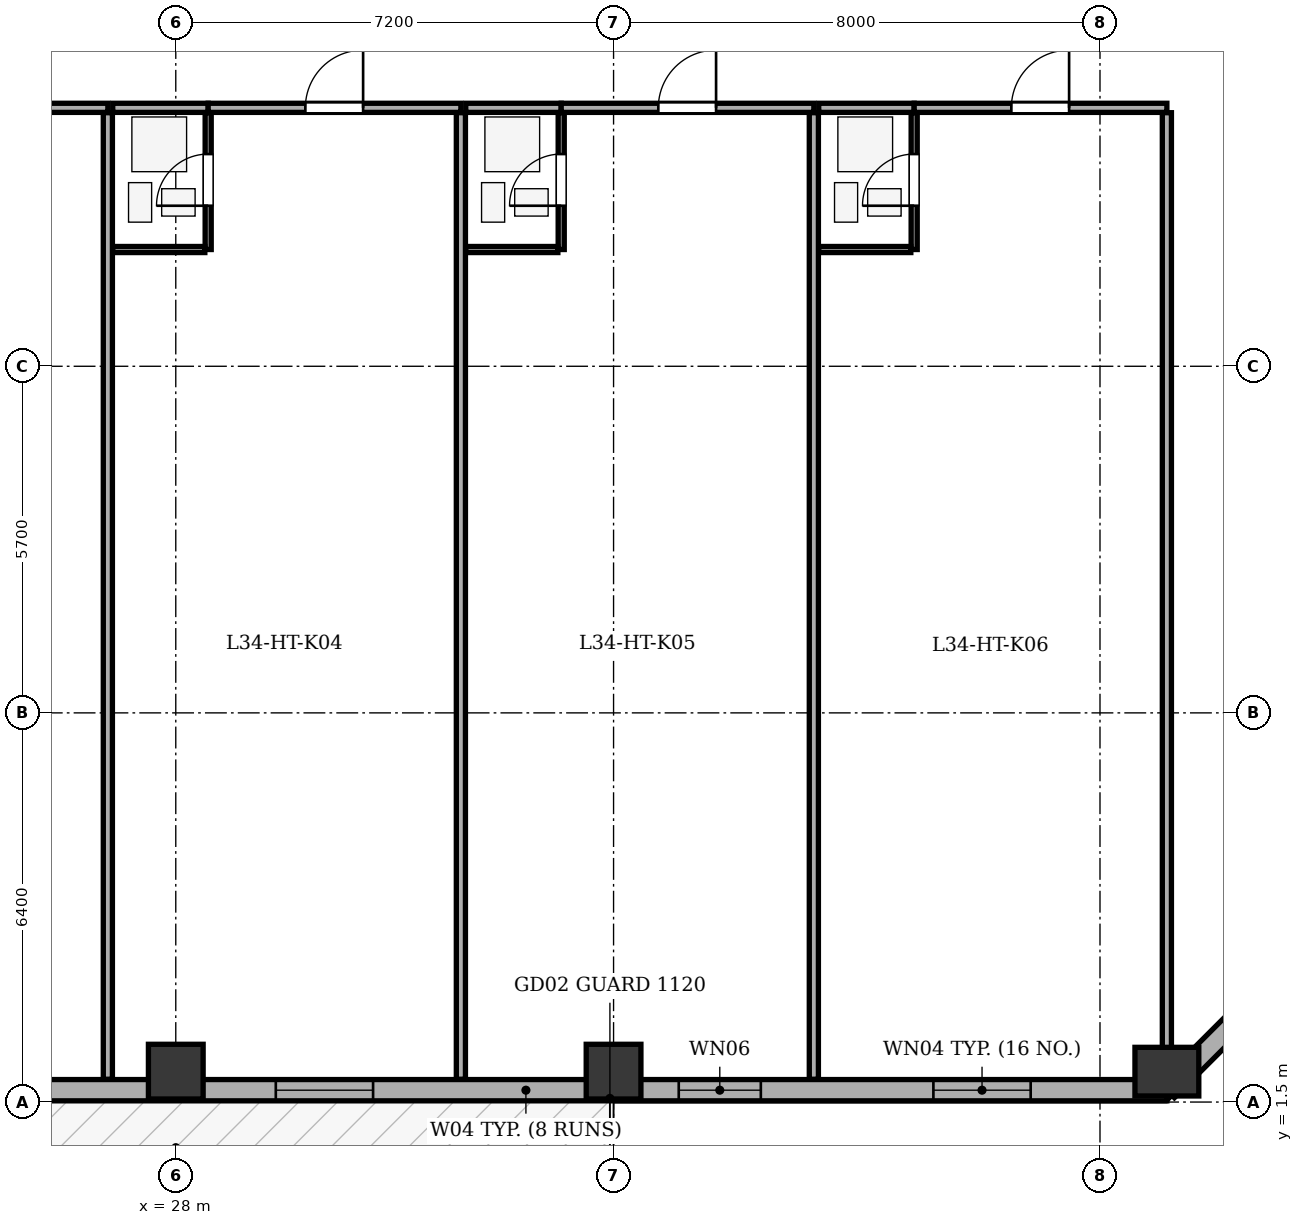
"""IFC4 building model, lengths in metres.
Left out: names, types, materials, properties, quantities, classifications, styles, units other than length and angle.
Written with IfcOpenShell. Run it as: python <this file> out.ifc"""

import sys

from ifc_helpers import new_model, si_unit, direction, frame, frame_2d, origin, origin_2d, place, context, subcontext, project, spatial, rectangle, extrude, element, fill, save


model = new_model("IFC4")
c1 = context("Model", 3, precision=1e-05, world=origin(), true_north=direction((0.0, 1.0)))
c2 = subcontext(c1, "Body", "Model", "MODEL_VIEW")
j1 = project(units=[si_unit("LENGTHUNIT", "METRE"), si_unit("PLANEANGLEUNIT", "RADIAN")], contexts=[c1])
p1 = place(None, origin())
s1 = spatial("IfcSite", under=j1, at=p1, CompositionType="ELEMENT")
p2 = place(p1, origin())
s2 = spatial("IfcBuilding", under=s1, at=p2, CompositionType="ELEMENT")
p3 = place(p2, frame((0.0, 0.0, 137.8)))
s3 = spatial("IfcBuildingStorey", under=s2, at=p3, CompositionType="ELEMENT", Elevation=137.8)
for number, where, z_axis, x_axis in (
    (1, (28.0, 2.0, 0.0), (0.0, 0.0, 1.0), (1.0, 0.0, 0.0)),
    (2, (35.2, 2.0, 0.0), (0.0, 0.0, 1.0), (1.0, 0.0, 0.0)),
):
    element("IfcColumn", number, at=place(p3, frame(where, z_axis=z_axis, x_axis=x_axis)), inside=s3, PredefinedType="COLUMN", context=c2, shape_type="SweptSolid", body=[
        extrude(rectangle(XDim=0.9, YDim=0.9, at=origin_2d()), origin(), (0.0, 0.0, 1.0), 3.5),
    ])
p4 = place(p3, frame((44.3, 2.0, 0.0), z_axis=(0.0, 0.0, 1.0), x_axis=(1.0, 0.0, 0.0)))
e3 = element("IfcColumn", 3, at=p4, inside=s3, PredefinedType="COLUMN", context=c2, shape_type="SweptSolid", body=[
    extrude(rectangle(XDim=0.8, YDim=1.05, at=origin_2d()), origin(), (0.0, 0.0, 1.0), 3.5),
])
p5 = place(p3, frame((44.3, 1.695, 0.0), z_axis=(0.0, 0.0, 1.0), x_axis=(-1.0, 0.0, 0.0)))
e4 = element("IfcWall", 4, at=p5, inside=s3, PredefinedType="STANDARD", context=c2, shape_type="SweptSolid", body=[
    extrude(rectangle(XDim=35.0, YDim=0.35, at=frame_2d((17.5, 0.0))), origin(), (0.0, 0.0, 1.0), 2.435),
])
p6 = place(p5, frame((19.6, 0.0, 0.0)))
e5 = element("IfcOpeningElement", 5, at=p6, cuts=e4, PredefinedType="OPENING", context=c2, shape_type="SweptSolid", body=[
    extrude(rectangle(XDim=1.0, YDim=2.02, at=frame_2d((0.5, 1.01))), frame((0.0, 0.185, 0.0), z_axis=(0.0, -1.0, 0.0), x_axis=(1.0, 0.0, 0.0)), (0.0, 0.0, 1.0), 0.37),
])
p7 = place(p5, frame((2.24, 0.0, 0.75)))
e6 = element("IfcOpeningElement", 6, at=p7, cuts=e4, PredefinedType="OPENING", context=c2, shape_type="SweptSolid", body=[
    extrude(rectangle(XDim=1.6, YDim=1.565, at=frame_2d((0.8, 0.782))), frame((0.0, 0.185, 0.0), z_axis=(0.0, -1.0, 0.0), x_axis=(1.0, 0.0, 0.0)), (0.0, 0.0, 1.0), 0.37),
])
p8 = place(p5, frame((6.678, 0.0, 0.75)))
e7 = element("IfcOpeningElement", 7, at=p8, cuts=e4, PredefinedType="OPENING", context=c2, shape_type="SweptSolid", body=[
    extrude(rectangle(XDim=1.35, YDim=1.565, at=frame_2d((0.675, 0.782))), frame((0.0, 0.185, 0.0), z_axis=(0.0, -1.0, 0.0), x_axis=(1.0, 0.0, 0.0)), (0.0, 0.0, 1.0), 0.37),
])
p9 = place(p5, frame((13.055, 0.0, 0.75)))
e8 = element("IfcOpeningElement", 8, at=p9, cuts=e4, PredefinedType="OPENING", context=c2, shape_type="SweptSolid", body=[
    extrude(rectangle(XDim=1.6, YDim=1.565, at=frame_2d((0.8, 0.782))), frame((0.0, 0.185, 0.0), z_axis=(0.0, -1.0, 0.0), x_axis=(1.0, 0.0, 0.0)), (0.0, 0.0, 1.0), 0.37),
])
p10 = place(p5, frame((25.2, 0.0, 0.75)))
e9 = element("IfcOpeningElement", 9, at=p10, cuts=e4, PredefinedType="OPENING", context=c2, shape_type="SweptSolid", body=[
    extrude(rectangle(XDim=1.6, YDim=1.565, at=frame_2d((0.8, 0.782))), frame((0.0, 0.185, 0.0), z_axis=(0.0, -1.0, 0.0), x_axis=(1.0, 0.0, 0.0)), (0.0, 0.0, 1.0), 0.37),
])
p11 = place(p5, frame((30.725, 0.0, 0.75)))
e10 = element("IfcOpeningElement", 10, at=p11, cuts=e4, PredefinedType="OPENING", context=c2, shape_type="SweptSolid", body=[
    extrude(rectangle(XDim=1.6, YDim=1.565, at=frame_2d((0.8, 0.782))), frame((0.0, 0.185, 0.0), z_axis=(0.0, -1.0, 0.0), x_axis=(1.0, 0.0, 0.0)), (0.0, 0.0, 1.0), 0.37),
])
p12 = place(p3, frame((49.105, 6.5, 0.0), z_axis=(0.0, 0.0, 1.0), x_axis=(-0.707106781187, -0.707106781187, 0.0)))
e11 = element("IfcWall", 11, at=p12, inside=s3, PredefinedType="STANDARD", context=c2, shape_type="SweptSolid", body=[
    extrude(rectangle(XDim=6.795, YDim=0.35, at=frame_2d((3.397, 0.0))), origin(), (0.0, 0.0, 1.0), 2.435),
])
p13 = place(p12, frame((2.698, 0.0, 0.75)))
e12 = element("IfcOpeningElement", 12, at=p13, cuts=e11, PredefinedType="OPENING", context=c2, shape_type="SweptSolid", body=[
    extrude(rectangle(XDim=1.4, YDim=1.565, at=frame_2d((0.7, 0.782))), frame((0.0, 0.185, 0.0), z_axis=(0.0, -1.0, 0.0), x_axis=(1.0, 0.0, 0.0)), (0.0, 0.0, 1.0), 0.37),
])
p14 = place(p3, frame((22.728, 17.85, 0.0), z_axis=(0.0, 0.0, 1.0), x_axis=(1.0, 0.0, 0.0)))
e13 = element("IfcWall", 13, at=p14, inside=s3, PredefinedType="PARTITIONING", context=c2, shape_type="SweptSolid", body=[
    extrude(rectangle(XDim=4.155, YDim=0.15, at=frame_2d((2.078, 0.0))), origin(), (0.0, 0.0, 1.0), 3.05),
])
p15 = place(p14, frame((1.597, 0.0, 0.0)))
e14 = element("IfcOpeningElement", 14, at=p15, cuts=e13, PredefinedType="OPENING", context=c2, shape_type="SweptSolid", body=[
    extrude(rectangle(XDim=0.95, YDim=2.1, at=frame_2d((0.475, 1.05))), frame((0.0, 0.085, 0.0), z_axis=(0.0, -1.0, 0.0), x_axis=(1.0, 0.0, 0.0)), (0.0, 0.0, 1.0), 0.17),
])
p16 = place(p3, frame((26.883, 1.875, 0.0), z_axis=(0.0, 0.0, 1.0), x_axis=(0.0, 1.0, 0.0)))
e15 = element("IfcWall", 15, at=p16, inside=s3, PredefinedType="PARTITIONING", context=c2, shape_type="SweptSolid", body=[
    extrude(rectangle(XDim=15.895, YDim=0.15, at=frame_2d((7.948, 0.0))), origin(), (0.0, 0.0, 1.0), 3.05),
])
p17 = place(p3, frame((26.963, 17.85, 0.0), z_axis=(0.0, 0.0, 1.0), x_axis=(1.0, 0.0, 0.0)))
e16 = element("IfcWall", 16, at=p17, inside=s3, PredefinedType="PARTITIONING", context=c2, shape_type="SweptSolid", body=[
    extrude(rectangle(XDim=1.57, YDim=0.15, at=frame_2d((0.785, 0.0))), origin(), (0.0, 0.0, 1.0), 3.05),
])
p18 = place(p3, frame((28.533, 17.85, 0.0), z_axis=(0.0, 0.0, 1.0), x_axis=(1.0, 0.0, 0.0)))
e17 = element("IfcWall", 17, at=p18, inside=s3, PredefinedType="PARTITIONING", context=c2, shape_type="SweptSolid", body=[
    extrude(rectangle(XDim=4.156, YDim=0.15, at=frame_2d((2.078, 0.0))), origin(), (0.0, 0.0, 1.0), 3.05),
])
p19 = place(p18, frame((1.598, 0.0, 0.0)))
e18 = element("IfcOpeningElement", 18, at=p19, cuts=e17, PredefinedType="OPENING", context=c2, shape_type="SweptSolid", body=[
    extrude(rectangle(XDim=0.95, YDim=2.1, at=frame_2d((0.475, 1.05))), frame((0.0, 0.085, 0.0), z_axis=(0.0, -1.0, 0.0), x_axis=(1.0, 0.0, 0.0)), (0.0, 0.0, 1.0), 0.17),
])
p20 = place(p3, frame((28.533, 15.52, 0.0), z_axis=(0.0, 0.0, 1.0), x_axis=(0.0, 1.0, 0.0)))
e19 = element("IfcWall", 19, at=p20, inside=s3, PredefinedType="PARTITIONING", context=c2, shape_type="SweptSolid", body=[
    extrude(rectangle(XDim=2.25, YDim=0.1, at=frame_2d((1.125, 0.0))), origin(), (0.0, 0.0, 1.0), 3.05),
])
p21 = place(p20, frame((0.72, 0.0, 0.0)))
e20 = element("IfcOpeningElement", 20, at=p21, cuts=e19, PredefinedType="OPENING", context=c2, shape_type="SweptSolid", body=[
    extrude(rectangle(XDim=0.85, YDim=2.05, at=frame_2d((0.425, 1.025))), frame((0.0, 0.06, 0.0), z_axis=(0.0, -1.0, 0.0), x_axis=(1.0, 0.0, 0.0)), (0.0, 0.0, 1.0), 0.12),
])
p22 = place(p3, frame((26.963, 15.52, 0.0), z_axis=(0.0, 0.0, 1.0), x_axis=(1.0, 0.0, 0.0)))
e21 = element("IfcWall", 21, at=p22, inside=s3, PredefinedType="PARTITIONING", context=c2, shape_type="SweptSolid", body=[
    extrude(rectangle(XDim=1.515, YDim=0.1, at=frame_2d((0.758, 0.0))), origin(), (0.0, 0.0, 1.0), 3.05),
])
p23 = place(p3, frame((32.689, 1.875, 0.0), z_axis=(0.0, 0.0, 1.0), x_axis=(0.0, 1.0, 0.0)))
e22 = element("IfcWall", 22, at=p23, inside=s3, PredefinedType="PARTITIONING", context=c2, shape_type="SweptSolid", body=[
    extrude(rectangle(XDim=15.895, YDim=0.15, at=frame_2d((7.948, 0.0))), origin(), (0.0, 0.0, 1.0), 3.05),
])
p24 = place(p3, frame((32.769, 17.85, 0.0), z_axis=(0.0, 0.0, 1.0), x_axis=(1.0, 0.0, 0.0)))
e23 = element("IfcWall", 23, at=p24, inside=s3, PredefinedType="PARTITIONING", context=c2, shape_type="SweptSolid", body=[
    extrude(rectangle(XDim=1.57, YDim=0.15, at=frame_2d((0.785, 0.0))), origin(), (0.0, 0.0, 1.0), 3.05),
])
p25 = place(p3, frame((34.339, 17.85, 0.0), z_axis=(0.0, 0.0, 1.0), x_axis=(1.0, 0.0, 0.0)))
e24 = element("IfcWall", 24, at=p25, inside=s3, PredefinedType="PARTITIONING", context=c2, shape_type="SweptSolid", body=[
    extrude(rectangle(XDim=4.155, YDim=0.15, at=frame_2d((2.077, 0.0))), origin(), (0.0, 0.0, 1.0), 3.05),
])
p26 = place(p25, frame((1.597, 0.0, 0.0)))
e25 = element("IfcOpeningElement", 25, at=p26, cuts=e24, PredefinedType="OPENING", context=c2, shape_type="SweptSolid", body=[
    extrude(rectangle(XDim=0.95, YDim=2.1, at=frame_2d((0.475, 1.05))), frame((0.0, 0.085, 0.0), z_axis=(0.0, -1.0, 0.0), x_axis=(1.0, 0.0, 0.0)), (0.0, 0.0, 1.0), 0.17),
])
p27 = place(p3, frame((34.339, 15.52, 0.0), z_axis=(0.0, 0.0, 1.0), x_axis=(0.0, 1.0, 0.0)))
e26 = element("IfcWall", 26, at=p27, inside=s3, PredefinedType="PARTITIONING", context=c2, shape_type="SweptSolid", body=[
    extrude(rectangle(XDim=2.25, YDim=0.1, at=frame_2d((1.125, 0.0))), origin(), (0.0, 0.0, 1.0), 3.05),
])
p28 = place(p27, frame((0.72, 0.0, 0.0)))
e27 = element("IfcOpeningElement", 27, at=p28, cuts=e26, PredefinedType="OPENING", context=c2, shape_type="SweptSolid", body=[
    extrude(rectangle(XDim=0.85, YDim=2.05, at=frame_2d((0.425, 1.025))), frame((0.0, 0.06, 0.0), z_axis=(0.0, -1.0, 0.0), x_axis=(1.0, 0.0, 0.0)), (0.0, 0.0, 1.0), 0.12),
])
p29 = place(p3, frame((32.769, 15.52, 0.0), z_axis=(0.0, 0.0, 1.0), x_axis=(1.0, 0.0, 0.0)))
e28 = element("IfcWall", 28, at=p29, inside=s3, PredefinedType="PARTITIONING", context=c2, shape_type="SweptSolid", body=[
    extrude(rectangle(XDim=1.515, YDim=0.1, at=frame_2d((0.757, 0.0))), origin(), (0.0, 0.0, 1.0), 3.05),
])
p30 = place(p3, frame((38.494, 1.875, 0.0), z_axis=(0.0, 0.0, 1.0), x_axis=(0.0, 1.0, 0.0)))
e29 = element("IfcWall", 29, at=p30, inside=s3, PredefinedType="PARTITIONING", context=c2, shape_type="SweptSolid", body=[
    extrude(rectangle(XDim=15.895, YDim=0.15, at=frame_2d((7.948, 0.0))), origin(), (0.0, 0.0, 1.0), 2.485),
])
p31 = place(p3, frame((38.574, 17.85, 0.0), z_axis=(0.0, 0.0, 1.0), x_axis=(1.0, 0.0, 0.0)))
e30 = element("IfcWall", 30, at=p31, inside=s3, PredefinedType="PARTITIONING", context=c2, shape_type="SweptSolid", body=[
    extrude(rectangle(XDim=1.57, YDim=0.15, at=frame_2d((0.785, 0.0))), origin(), (0.0, 0.0, 1.0), 3.05),
])
p32 = place(p3, frame((40.144, 17.85, 0.0), z_axis=(0.0, 0.0, 1.0), x_axis=(1.0, 0.0, 0.0)))
e31 = element("IfcWall", 31, at=p32, inside=s3, PredefinedType="PARTITIONING", context=c2, shape_type="SweptSolid", body=[
    extrude(rectangle(XDim=4.156, YDim=0.15, at=frame_2d((2.078, 0.0))), origin(), (0.0, 0.0, 1.0), 3.05),
])
p33 = place(p32, frame((1.598, 0.0, 0.0)))
e32 = element("IfcOpeningElement", 32, at=p33, cuts=e31, PredefinedType="OPENING", context=c2, shape_type="SweptSolid", body=[
    extrude(rectangle(XDim=0.95, YDim=2.1, at=frame_2d((0.475, 1.05))), frame((0.0, 0.085, 0.0), z_axis=(0.0, -1.0, 0.0), x_axis=(1.0, 0.0, 0.0)), (0.0, 0.0, 1.0), 0.17),
])
p34 = place(p3, frame((40.144, 15.52, 0.0), z_axis=(0.0, 0.0, 1.0), x_axis=(0.0, 1.0, 0.0)))
e33 = element("IfcWall", 33, at=p34, inside=s3, PredefinedType="PARTITIONING", context=c2, shape_type="SweptSolid", body=[
    extrude(rectangle(XDim=2.25, YDim=0.1, at=frame_2d((1.125, 0.0))), origin(), (0.0, 0.0, 1.0), 3.05),
])
p35 = place(p34, frame((0.72, 0.0, 0.0)))
e34 = element("IfcOpeningElement", 34, at=p35, cuts=e33, PredefinedType="OPENING", context=c2, shape_type="SweptSolid", body=[
    extrude(rectangle(XDim=0.85, YDim=2.05, at=frame_2d((0.425, 1.025))), frame((0.0, 0.06, 0.0), z_axis=(0.0, -1.0, 0.0), x_axis=(1.0, 0.0, 0.0)), (0.0, 0.0, 1.0), 0.12),
])
p36 = place(p3, frame((38.574, 15.52, 0.0), z_axis=(0.0, 0.0, 1.0), x_axis=(1.0, 0.0, 0.0)))
e35 = element("IfcWall", 35, at=p36, inside=s3, PredefinedType="PARTITIONING", context=c2, shape_type="SweptSolid", body=[
    extrude(rectangle(XDim=1.515, YDim=0.1, at=frame_2d((0.758, 0.0))), origin(), (0.0, 0.0, 1.0), 3.05),
])
p37 = place(p3, frame((44.3, 1.875, 0.0), z_axis=(0.0, 0.0, 1.0), x_axis=(0.0, 1.0, 0.0)))
e36 = element("IfcWall", 36, at=p37, inside=s3, PredefinedType="PARTITIONING", context=c2, shape_type="SweptSolid", body=[
    extrude(rectangle(XDim=15.895, YDim=0.15, at=frame_2d((7.948, 0.0))), origin(), (0.0, 0.0, 1.0), 3.05),
])
p38 = place(p7, origin())
e37 = element("IfcWindow", 37, at=p38, inside=s3, PartitioningType="SINGLE_PANEL", PredefinedType="WINDOW", context=c2, shape_type="SweptSolid", body=[
    extrude(rectangle(XDim=1.6, YDim=1.565, at=frame_2d((0.8, 0.782))), frame((0.0, -0.01, 0.0), z_axis=(0.0, -1.0, 0.0), x_axis=(1.0, 0.0, 0.0)), (0.0, 0.0, 1.0), 0.06),
])
fill(e6, e37)
p39 = place(p8, origin())
e38 = element("IfcWindow", 38, at=p39, inside=s3, PartitioningType="SINGLE_PANEL", PredefinedType="WINDOW", context=c2, shape_type="SweptSolid", body=[
    extrude(rectangle(XDim=1.35, YDim=1.565, at=frame_2d((0.675, 0.782))), frame((0.0, -0.01, 0.0), z_axis=(0.0, -1.0, 0.0), x_axis=(1.0, 0.0, 0.0)), (0.0, 0.0, 1.0), 0.06),
])
fill(e7, e38)
p40 = place(p9, origin())
e39 = element("IfcWindow", 39, at=p40, inside=s3, PartitioningType="SINGLE_PANEL", PredefinedType="WINDOW", context=c2, shape_type="SweptSolid", body=[
    extrude(rectangle(XDim=1.6, YDim=1.565, at=frame_2d((0.8, 0.782))), frame((0.0, -0.01, 0.0), z_axis=(0.0, -1.0, 0.0), x_axis=(1.0, 0.0, 0.0)), (0.0, 0.0, 1.0), 0.06),
])
fill(e8, e39)
p41 = place(p21, origin())
e40 = element("IfcDoor", 40, at=p41, inside=s3, OperationType="SINGLE_SWING_LEFT", PredefinedType="DOOR", context=c2, shape_type="SweptSolid", body=[
    extrude(rectangle(XDim=0.85, YDim=2.05, at=frame_2d((0.425, 1.025))), frame((0.0, 0.025, 0.0), z_axis=(0.0, -1.0, 0.0), x_axis=(1.0, 0.0, 0.0)), (0.0, 0.0, 1.0), 0.05),
])
fill(e20, e40)
p42 = place(p19, origin())
e41 = element("IfcDoor", 41, at=p42, inside=s3, OperationType="SINGLE_SWING_RIGHT", PredefinedType="DOOR", context=c2, shape_type="SweptSolid", body=[
    extrude(rectangle(XDim=0.95, YDim=2.1, at=frame_2d((0.475, 1.05))), frame((0.0, 0.025, 0.0), z_axis=(0.0, -1.0, 0.0), x_axis=(1.0, 0.0, 0.0)), (0.0, 0.0, 1.0), 0.05),
])
fill(e18, e41)
p43 = place(p28, origin())
e42 = element("IfcDoor", 42, at=p43, inside=s3, OperationType="SINGLE_SWING_LEFT", PredefinedType="DOOR", context=c2, shape_type="SweptSolid", body=[
    extrude(rectangle(XDim=0.85, YDim=2.05, at=frame_2d((0.425, 1.025))), frame((0.0, 0.025, 0.0), z_axis=(0.0, -1.0, 0.0), x_axis=(1.0, 0.0, 0.0)), (0.0, 0.0, 1.0), 0.05),
])
fill(e27, e42)
p44 = place(p26, origin())
e43 = element("IfcDoor", 43, at=p44, inside=s3, OperationType="SINGLE_SWING_RIGHT", PredefinedType="DOOR", context=c2, shape_type="SweptSolid", body=[
    extrude(rectangle(XDim=0.95, YDim=2.1, at=frame_2d((0.475, 1.05))), frame((0.0, 0.025, 0.0), z_axis=(0.0, -1.0, 0.0), x_axis=(1.0, 0.0, 0.0)), (0.0, 0.0, 1.0), 0.05),
])
fill(e25, e43)
p45 = place(p35, origin())
e44 = element("IfcDoor", 44, at=p45, inside=s3, OperationType="SINGLE_SWING_LEFT", PredefinedType="DOOR", context=c2, shape_type="SweptSolid", body=[
    extrude(rectangle(XDim=0.85, YDim=2.05, at=frame_2d((0.425, 1.025))), frame((0.0, 0.025, 0.0), z_axis=(0.0, -1.0, 0.0), x_axis=(1.0, 0.0, 0.0)), (0.0, 0.0, 1.0), 0.05),
])
fill(e34, e44)
p46 = place(p33, origin())
e45 = element("IfcDoor", 45, at=p46, inside=s3, OperationType="SINGLE_SWING_RIGHT", PredefinedType="DOOR", context=c2, shape_type="SweptSolid", body=[
    extrude(rectangle(XDim=0.95, YDim=2.1, at=frame_2d((0.475, 1.05))), frame((0.0, 0.025, 0.0), z_axis=(0.0, -1.0, 0.0), x_axis=(1.0, 0.0, 0.0)), (0.0, 0.0, 1.0), 0.05),
])
fill(e32, e45)
save(model, sys.argv[1])
